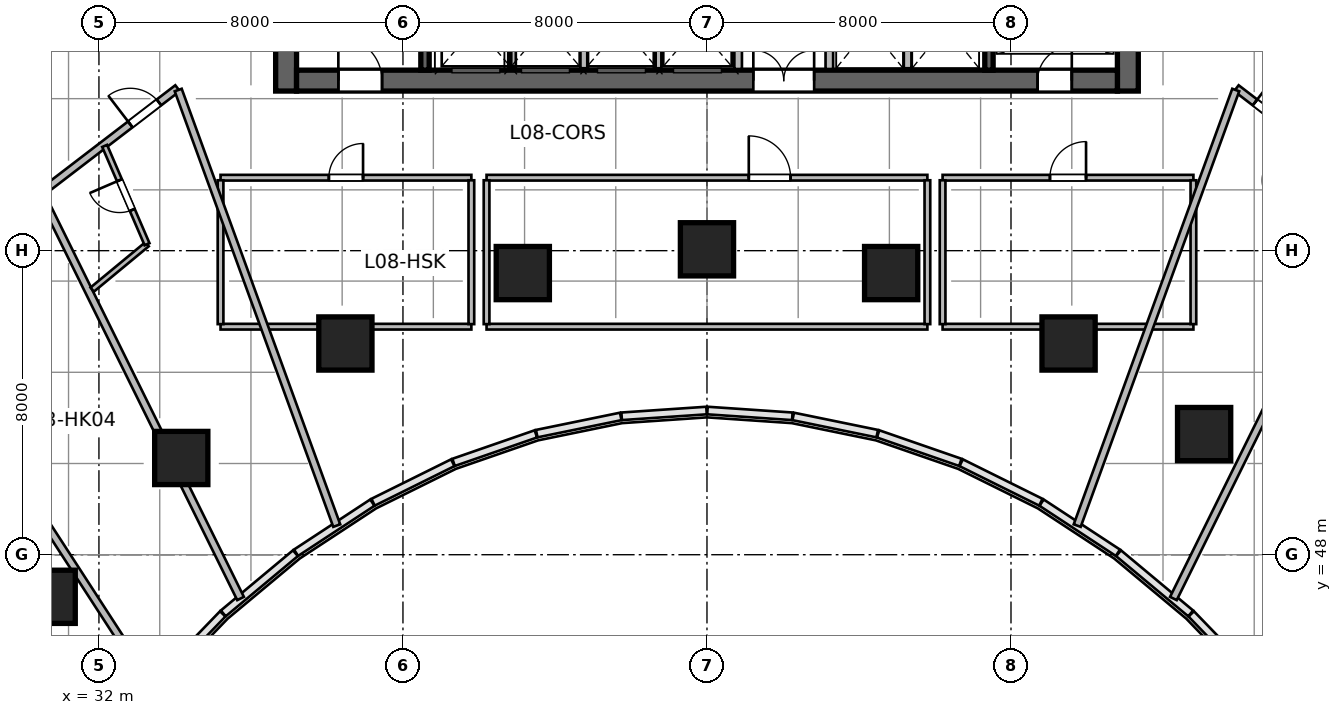
"""IFC4 building model, lengths in metres.
Left out: names, types, materials, properties, quantities, classifications, styles, units other than length and angle.
Written with IfcOpenShell. Run it as: python <this file> out.ifc"""

import sys

from ifc_helpers import new_model, si_unit, direction, frame, frame_2d, origin, origin_2d, place, context, subcontext, project, spatial, rectangle, circle, extrude, source, transform, mapped, element, fill, save


model = new_model("IFC4")
c1 = context("Model", 3, precision=1e-05, world=origin(), true_north=direction((0.0, 1.0)))
c2 = subcontext(c1, "Body", "Model", "MODEL_VIEW")
j1 = project(units=[si_unit("LENGTHUNIT", "METRE"), si_unit("PLANEANGLEUNIT", "RADIAN")], contexts=[c1])
p1 = place(None, origin())
s1 = spatial("IfcSite", under=j1, at=p1, CompositionType="ELEMENT")
p2 = place(p1, origin())
s2 = spatial("IfcBuilding", under=s1, at=p2, CompositionType="ELEMENT")
p3 = place(p2, frame((0.0, 0.0, 42.6)))
s3 = spatial("IfcBuildingStorey", under=s2, at=p3, CompositionType="ELEMENT", Elevation=42.6)
m1 = source(origin(), c2, "Body", "SweptSolid", [
    extrude(rectangle(XDim=12.0, YDim=0.55, at=frame_2d((6.0, 0.0))), origin(), (0.0, 0.0, 1.0), 3.6),
])
for number, where, z_axis, x_axis in (
    (1, (36.925, 60.2, 0.0), (0.0, 0.0, 1.0), (0.0, 1.0, 0.0)),
    (2, (59.075, 60.2, 0.0), (0.0, 0.0, 1.0), (0.0, 1.0, 0.0)),
):
    element("IfcWall", number, at=place(p3, frame(where, z_axis=z_axis, x_axis=x_axis)), inside=s3, PredefinedType="SHEAR", context=c2, shape_type="MappedRepresentation", body=[
        mapped(m1, transform((0.0, 0.0, 0.0), scale=1.0)),
    ])
m2 = source(origin(), c2, "Body", "SweptSolid", [
    extrude(rectangle(XDim=21.6, YDim=0.55, at=frame_2d((10.8, 0.0))), origin(), (0.0, 0.0, 1.0), 3.6),
])
p4 = place(p3, frame((37.2, 60.475, 0.0), z_axis=(0.0, 0.0, 1.0), x_axis=(1.0, 0.0, 0.0)))
e3 = element("IfcWall", 3, at=p4, inside=s3, PredefinedType="SHEAR", context=c2, shape_type="MappedRepresentation", body=[
    mapped(m2, transform((0.0, 0.0, 0.0), scale=1.0)),
])
p5 = place(p4, frame((1.1, 0.0, 0.0)))
e4 = element("IfcOpeningElement", 4, at=p5, cuts=e3, PredefinedType="OPENING", context=c2, shape_type="SweptSolid", body=[
    extrude(rectangle(XDim=1.15, YDim=2.15, at=frame_2d((0.575, 1.075))), frame((0.0, 0.285, 0.0), z_axis=(0.0, -1.0, 0.0), x_axis=(1.0, 0.0, 0.0)), (0.0, 0.0, 1.0), 0.57),
])
p6 = place(p4, frame((19.5, 0.0, 0.0)))
e5 = element("IfcOpeningElement", 5, at=p6, cuts=e3, PredefinedType="OPENING", context=c2, shape_type="SweptSolid", body=[
    extrude(rectangle(XDim=0.9, YDim=2.1, at=frame_2d((0.45, 1.05))), frame((0.0, 0.285, 0.0), z_axis=(0.0, -1.0, 0.0), x_axis=(1.0, 0.0, 0.0)), (0.0, 0.0, 1.0), 0.57),
])
p7 = place(p4, frame((12.02, 0.0, 0.0)))
e6 = element("IfcOpeningElement", 6, at=p7, cuts=e3, PredefinedType="OPENING", context=c2, shape_type="SweptSolid", body=[
    extrude(rectangle(XDim=1.6, YDim=2.15, at=frame_2d((0.8, 1.075))), frame((0.0, 0.285, 0.0), z_axis=(0.0, -1.0, 0.0), x_axis=(1.0, 0.0, 0.0)), (0.0, 0.0, 1.0), 0.57),
])
m3 = source(origin(), c2, "Body", "SweptSolid", [
    extrude(rectangle(XDim=10.9, YDim=0.22, at=frame_2d((5.45, 0.0))), origin(), (0.0, 0.0, 1.0), 3.6),
])
p8 = place(p3, frame((40.58, 60.75, 0.0), z_axis=(0.0, 0.0, 1.0), x_axis=(0.0, 1.0, 0.0)))
e7 = element("IfcWall", 7, at=p8, inside=s3, PredefinedType="SHEAR", context=c2, shape_type="MappedRepresentation", body=[
    mapped(m3, transform((0.0, 0.0, 0.0), scale=1.0)),
])
p9 = place(p3, frame((55.42, 60.75, 0.0), z_axis=(0.0, 0.0, 1.0), x_axis=(0.0, 1.0, 0.0)))
e8 = element("IfcWall", 8, at=p9, inside=s3, PredefinedType="SHEAR", context=c2, shape_type="MappedRepresentation", body=[
    mapped(m3, transform((0.0, 0.0, 0.0), scale=1.0)),
])
p10 = place(p9, frame((9.495, 0.0, 0.0)))
e9 = element("IfcOpeningElement", 9, at=p10, cuts=e8, PredefinedType="OPENING", context=c2, shape_type="SweptSolid", body=[
    extrude(rectangle(XDim=1.15, YDim=2.15, at=frame_2d((0.575, 1.075))), frame((0.0, 0.12, 0.0), z_axis=(0.0, -1.0, 0.0), x_axis=(1.0, 0.0, 0.0)), (0.0, 0.0, 1.0), 0.24),
])
m4 = source(origin(), c2, "Body", "SweptSolid", [
    extrude(circle(Radius=0.7, at=origin_2d()), origin(), (0.0, 0.0, 1.0), 3.6),
])
for number, where, z_axis, x_axis in (
    (10, (30.677, 46.892, 0.0), (0.0, 0.0, 1.0), (-0.571, 0.821, 0.0)),
    (11, (34.166, 50.545, 0.0), (0.0, 0.0, 1.0), (-0.436, 0.9, 0.0)),
    (12, (38.485, 53.558, 0.0), (0.0, 0.0, 1.0), (-0.289, 0.957, 0.0)),
    (13, (43.154, 55.411, 0.0), (0.0, 0.0, 1.0), (-0.143, 0.99, 0.0)),
    (14, (48.0, 56.036, 0.0), (0.0, 0.0, 1.0), (0.0, 1.0, 0.0)),
    (15, (52.846, 55.411, 0.0), (0.0, 0.0, 1.0), (0.143, 0.99, 0.0)),
    (16, (57.515, 53.558, 0.0), (0.0, 0.0, 1.0), (0.289, 0.957, 0.0)),
    (17, (61.082, 51.175, 0.0), (0.0, 0.0, 1.0), (0.409, 0.912, 0.0)),
):
    element("IfcColumn", number, at=place(p3, frame(where, z_axis=z_axis, x_axis=x_axis)), inside=s3, PredefinedType="COLUMN", context=c2, shape_type="MappedRepresentation", body=[
        mapped(m4, transform((0.0, 0.0, 0.0), scale=1.0)),
    ])
m5 = source(origin(), c2, "Body", "SweptSolid", [
    extrude(rectangle(XDim=2.24, YDim=0.2, at=frame_2d((1.12, 0.0))), origin(), (0.0, 0.0, 1.0), 3.36),
])
for number, where, z_axis, x_axis in (
    (18, (48.82, 60.78, 0.0), (0.0, 0.0, 1.0), (0.0, 1.0, 0.0)),
    (19, (51.22, 60.78, 0.0), (0.0, 0.0, 1.0), (0.0, 1.0, 0.0)),
):
    element("IfcWall", number, at=place(p3, frame(where, z_axis=z_axis, x_axis=x_axis)), inside=s3, PredefinedType="SOLIDWALL", context=c2, shape_type="MappedRepresentation", body=[
        mapped(m5, transform((0.0, 0.0, 0.0), scale=1.0)),
    ])
m6 = source(origin(), c2, "Body", "SweptSolid", [
    extrude(rectangle(XDim=2.2, YDim=0.2, at=frame_2d((1.1, 0.0))), origin(), (0.0, 0.0, 1.0), 3.36),
])
for number, where, z_axis, x_axis in (
    (20, (42.87, 60.8, 0.0), (0.0, 0.0, 1.0), (0.0, 1.0, 0.0)),
    (21, (44.77, 60.8, 0.0), (0.0, 0.0, 1.0), (0.0, 1.0, 0.0)),
    (22, (46.7, 60.8, 0.0), (0.0, 0.0, 1.0), (0.0, 1.0, 0.0)),
    (23, (53.28, 60.8, 0.0), (0.0, 0.0, 1.0), (0.0, 1.0, 0.0)),
):
    element("IfcWall", number, at=place(p3, frame(where, z_axis=z_axis, x_axis=x_axis)), inside=s3, PredefinedType="SOLIDWALL", context=c2, shape_type="MappedRepresentation", body=[
        mapped(m6, transform((0.0, 0.0, 0.0), scale=1.0)),
    ])
m7 = source(origin(), c2, "Body", "SweptSolid", [
    extrude(rectangle(XDim=6.6, YDim=0.15, at=frame_2d((3.3, 0.0))), origin(), (0.0, 0.0, 1.0), 2.803),
])
p11 = place(p3, frame((35.2, 54.0, 0.0), z_axis=(0.0, 0.0, 1.0), x_axis=(1.0, 0.0, 0.0)))
e24 = element("IfcWall", 24, at=p11, inside=s3, PredefinedType="PARTITIONING", context=c2, shape_type="MappedRepresentation", body=[
    mapped(m7, transform((0.0, 0.0, 0.0), scale=1.0)),
])
m8 = source(origin(), c2, "Body", "SweptSolid", [
    extrude(rectangle(XDim=6.6, YDim=0.15, at=frame_2d((3.3, 0.0))), origin(), (0.0, 0.0, 1.0), 3.36),
])
p12 = place(p3, frame((35.2, 57.92, 0.0), z_axis=(0.0, 0.0, 1.0), x_axis=(1.0, 0.0, 0.0)))
e25 = element("IfcWall", 25, at=p12, inside=s3, PredefinedType="PARTITIONING", context=c2, shape_type="MappedRepresentation", body=[
    mapped(m8, transform((0.0, 0.0, 0.0), scale=1.0)),
])
p13 = place(p12, frame((2.85, 0.0, 0.0)))
e26 = element("IfcOpeningElement", 26, at=p13, cuts=e25, PredefinedType="OPENING", context=c2, shape_type="SweptSolid", body=[
    extrude(rectangle(XDim=0.9, YDim=2.1, at=frame_2d((0.45, 1.05))), frame((0.0, 0.085, 0.0), z_axis=(0.0, -1.0, 0.0), x_axis=(1.0, 0.0, 0.0)), (0.0, 0.0, 1.0), 0.17),
])
m9 = source(origin(), c2, "Body", "SweptSolid", [
    extrude(rectangle(XDim=3.785, YDim=0.15, at=frame_2d((1.893, 0.0))), origin(), (0.0, 0.0, 1.0), 3.36),
])
for number, where, z_axis, x_axis in (
    (27, (35.2, 54.067, 0.0), (0.0, 0.0, 1.0), (0.0, 1.0, 0.0)),
    (28, (41.8, 54.067, 0.0), (0.0, 0.0, 1.0), (0.0, 1.0, 0.0)),
):
    element("IfcWall", number, at=place(p3, frame(where, z_axis=z_axis, x_axis=x_axis)), inside=s3, PredefinedType="PARTITIONING", context=c2, shape_type="MappedRepresentation", body=[
        mapped(m9, transform((0.0, 0.0, 0.0), scale=1.0)),
    ])
m10 = source(origin(), c2, "Body", "SweptSolid", [
    extrude(rectangle(XDim=11.6, YDim=0.15, at=frame_2d((5.8, 0.0))), origin(), (0.0, 0.0, 1.0), 3.36),
])
p14 = place(p3, frame((42.2, 54.0, 0.0), z_axis=(0.0, 0.0, 1.0), x_axis=(1.0, 0.0, 0.0)))
e29 = element("IfcWall", 29, at=p14, inside=s3, PredefinedType="PARTITIONING", context=c2, shape_type="MappedRepresentation", body=[
    mapped(m10, transform((0.0, 0.0, 0.0), scale=1.0)),
])
p15 = place(p3, frame((42.2, 57.92, 0.0), z_axis=(0.0, 0.0, 1.0), x_axis=(1.0, 0.0, 0.0)))
e30 = element("IfcWall", 30, at=p15, inside=s3, PredefinedType="PARTITIONING", context=c2, shape_type="MappedRepresentation", body=[
    mapped(m10, transform((0.0, 0.0, 0.0), scale=1.0)),
])
p16 = place(p15, frame((6.9, 0.0, 0.0)))
e31 = element("IfcOpeningElement", 31, at=p16, cuts=e30, PredefinedType="OPENING", context=c2, shape_type="SweptSolid", body=[
    extrude(rectangle(XDim=1.1, YDim=2.15, at=frame_2d((0.55, 1.075))), frame((0.0, 0.085, 0.0), z_axis=(0.0, -1.0, 0.0), x_axis=(1.0, 0.0, 0.0)), (0.0, 0.0, 1.0), 0.17),
])
for number, where, z_axis, x_axis in (
    (32, (42.2, 54.067, 0.0), (0.0, 0.0, 1.0), (0.0, 1.0, 0.0)),
    (33, (53.8, 54.067, 0.0), (0.0, 0.0, 1.0), (0.0, 1.0, 0.0)),
):
    element("IfcWall", number, at=place(p3, frame(where, z_axis=z_axis, x_axis=x_axis)), inside=s3, PredefinedType="PARTITIONING", context=c2, shape_type="MappedRepresentation", body=[
        mapped(m9, transform((0.0, 0.0, 0.0), scale=1.0)),
    ])
p17 = place(p3, frame((54.2, 54.0, 0.0), z_axis=(0.0, 0.0, 1.0), x_axis=(1.0, 0.0, 0.0)))
e34 = element("IfcWall", 34, at=p17, inside=s3, PredefinedType="PARTITIONING", context=c2, shape_type="MappedRepresentation", body=[
    mapped(m7, transform((0.0, 0.0, 0.0), scale=1.0)),
])
p18 = place(p3, frame((54.2, 57.92, 0.0), z_axis=(0.0, 0.0, 1.0), x_axis=(1.0, 0.0, 0.0)))
e35 = element("IfcWall", 35, at=p18, inside=s3, PredefinedType="PARTITIONING", context=c2, shape_type="MappedRepresentation", body=[
    mapped(m8, transform((0.0, 0.0, 0.0), scale=1.0)),
])
p19 = place(p18, frame((2.825, 0.0, 0.0)))
e36 = element("IfcOpeningElement", 36, at=p19, cuts=e35, PredefinedType="OPENING", context=c2, shape_type="SweptSolid", body=[
    extrude(rectangle(XDim=0.95, YDim=2.1, at=frame_2d((0.475, 1.05))), frame((0.0, 0.085, 0.0), z_axis=(0.0, -1.0, 0.0), x_axis=(1.0, 0.0, 0.0)), (0.0, 0.0, 1.0), 0.17),
])
for number, where, z_axis, x_axis in (
    (37, (54.2, 54.067, 0.0), (0.0, 0.0, 1.0), (0.0, 1.0, 0.0)),
    (38, (60.8, 54.067, 0.0), (0.0, 0.0, 1.0), (0.0, 1.0, 0.0)),
):
    element("IfcWall", number, at=place(p3, frame(where, z_axis=z_axis, x_axis=x_axis)), inside=s3, PredefinedType="PARTITIONING", context=c2, shape_type="MappedRepresentation", body=[
        mapped(m9, transform((0.0, 0.0, 0.0), scale=1.0)),
    ])
m11 = source(origin(), c2, "Body", "SweptSolid", [
    extrude(rectangle(XDim=11.053, YDim=0.195, at=frame_2d((5.527, 0.0))), origin(), (0.0, 0.0, 1.0), 2.984),
])
p20 = place(p3, frame((31.466, 41.949, 0.0), z_axis=(0.0, 0.0, 1.0), x_axis=(-0.638131235571, 0.769927611005, 0.0)))
e39 = element("IfcWall", 39, at=p20, inside=s3, PredefinedType="PARTITIONING", context=c2, shape_type="MappedRepresentation", body=[
    mapped(m11, transform((0.0, 0.0, 0.0), scale=1.0)),
])
m12 = source(origin(), c2, "Body", "SweptSolid", [
    extrude(rectangle(XDim=11.429, YDim=0.195, at=frame_2d((5.714, 0.0))), origin(), (0.0, 0.0, 1.0), 3.36),
])
p21 = place(p3, frame((33.396, 44.511, 0.0), z_axis=(0.0, 0.0, 1.0), x_axis=(-0.544215487077, 0.838945471187, 0.0)))
e40 = element("IfcWall", 40, at=p21, inside=s3, PredefinedType="PARTITIONING", context=c2, shape_type="MappedRepresentation", body=[
    mapped(m12, transform((0.0, 0.0, 0.0), scale=1.0)),
])
m13 = source(origin(), c2, "Body", "SweptSolid", [
    extrude(rectangle(XDim=11.844, YDim=0.195, at=frame_2d((5.922, 0.0))), origin(), (0.0, 0.0, 1.0), 2.644),
])
p22 = place(p3, frame((35.727, 46.848, 0.0), z_axis=(0.0, 0.0, 1.0), x_axis=(-0.442871152218, 0.896585267854, 0.0)))
e41 = element("IfcWall", 41, at=p22, inside=s3, PredefinedType="PARTITIONING", context=c2, shape_type="MappedRepresentation", body=[
    mapped(m13, transform((0.0, 0.0, 0.0), scale=1.0)),
])
m14 = source(origin(), c2, "Body", "SweptSolid", [
    extrude(rectangle(XDim=4.895, YDim=0.195, at=frame_2d((2.447, 0.0))), origin(), (0.0, 0.0, 1.0), 3.36),
])
p23 = place(p3, frame((29.113, 60.238, 0.0), z_axis=(0.0, 0.0, 1.0), x_axis=(0.793896075849, 0.608053468661, 0.0)))
e42 = element("IfcWall", 42, at=p23, inside=s3, PredefinedType="PARTITIONING", context=c2, shape_type="MappedRepresentation", body=[
    mapped(m14, transform((0.0, 0.0, 0.0), scale=1.0)),
])
p24 = place(p23, frame((3.245, 0.0, 0.0)))
e43 = element("IfcOpeningElement", 43, at=p24, cuts=e42, PredefinedType="OPENING", context=c2, shape_type="SweptSolid", body=[
    extrude(rectangle(XDim=0.95, YDim=2.15, at=frame_2d((0.475, 1.075))), frame((0.0, 0.107, 0.0), z_axis=(0.0, -1.0, 0.0), x_axis=(1.0, 0.0, 0.0)), (0.0, 0.0, 1.0), 0.215),
])
m15 = source(origin(), c2, "Body", "SweptSolid", [
    extrude(rectangle(XDim=4.546, YDim=0.195, at=frame_2d((2.273, 0.0))), origin(), (0.0, 0.0, 1.0), 3.36),
])
p25 = place(p3, frame((30.459, 57.511, 0.0), z_axis=(0.0, 0.0, 1.0), x_axis=(0.793907931297, 0.608037989457, 0.0)))
e44 = element("IfcWall", 44, at=p25, inside=s3, PredefinedType="PARTITIONING", context=c2, shape_type="MappedRepresentation", body=[
    mapped(m15, transform((0.0, 0.0, 0.0), scale=1.0)),
])
p26 = place(p25, frame((2.98, 0.0, 0.0)))
e45 = element("IfcOpeningElement", 45, at=p26, cuts=e44, PredefinedType="OPENING", context=c2, shape_type="SweptSolid", body=[
    extrude(rectangle(XDim=0.95, YDim=2.15, at=frame_2d((0.475, 1.075))), frame((0.0, 0.107, 0.0), z_axis=(0.0, -1.0, 0.0), x_axis=(1.0, 0.0, 0.0)), (0.0, 0.0, 1.0), 0.215),
])
m16 = source(origin(), c2, "Body", "SweptSolid", [
    extrude(rectangle(XDim=12.196, YDim=0.195, at=frame_2d((6.098, 0.0))), origin(), (0.0, 0.0, 1.0), 3.36),
])
p27 = place(p3, frame((38.258, 48.766, 0.0), z_axis=(0.0, 0.0, 1.0), x_axis=(-0.342022711534, 0.939691686031, 0.0)))
e46 = element("IfcWall", 46, at=p27, inside=s3, PredefinedType="PARTITIONING", context=c2, shape_type="MappedRepresentation", body=[
    mapped(m16, transform((0.0, 0.0, 0.0), scale=1.0)),
])
m17 = source(origin(), c2, "Body", "SweptSolid", [
    extrude(rectangle(XDim=1.873, YDim=0.14, at=frame_2d((0.937, 0.0))), origin(), (0.0, 0.0, 1.0), 3.36),
])
p28 = place(p3, frame((31.823, 54.976, 0.0), z_axis=(0.0, 0.0, 1.0), x_axis=(0.77069451688, 0.637204803537, 0.0)))
e47 = element("IfcWall", 47, at=p28, inside=s3, PredefinedType="PARTITIONING", context=c2, shape_type="MappedRepresentation", body=[
    mapped(m17, transform((0.0, 0.0, 0.0), scale=1.0)),
])
m18 = source(origin(), c2, "Body", "SweptSolid", [
    extrude(rectangle(XDim=2.817, YDim=0.14, at=frame_2d((1.409, 0.0))), origin(), (0.0, 0.0, 1.0), 3.36),
])
p29 = place(p3, frame((33.266, 56.169, 0.0), z_axis=(0.0, 0.0, 1.0), x_axis=(-0.395999429727, 0.918250756415, 0.0)))
e48 = element("IfcWall", 48, at=p29, inside=s3, PredefinedType="PARTITIONING", context=c2, shape_type="MappedRepresentation", body=[
    mapped(m18, transform((0.0, 0.0, 0.0), scale=1.0)),
])
p30 = place(p29, frame((0.984, 0.0, 0.0)))
e49 = element("IfcOpeningElement", 49, at=p30, cuts=e48, PredefinedType="OPENING", context=c2, shape_type="SweptSolid", body=[
    extrude(rectangle(XDim=0.85, YDim=2.05, at=frame_2d((0.425, 1.025))), frame((0.0, 0.08, 0.0), z_axis=(0.0, -1.0, 0.0), x_axis=(1.0, 0.0, 0.0)), (0.0, 0.0, 1.0), 0.16),
])
p31 = place(p3, frame((61.931, 60.275, 0.0), z_axis=(0.0, 0.0, 1.0), x_axis=(0.793907931297, -0.608037989457, 0.0)))
e50 = element("IfcWall", 50, at=p31, inside=s3, PredefinedType="PARTITIONING", context=c2, shape_type="MappedRepresentation", body=[
    mapped(m15, transform((0.0, 0.0, 0.0), scale=1.0)),
])
p32 = place(p31, frame((0.616, 0.0, 0.0)))
e51 = element("IfcOpeningElement", 51, at=p32, cuts=e50, PredefinedType="OPENING", context=c2, shape_type="SweptSolid", body=[
    extrude(rectangle(XDim=0.95, YDim=2.15, at=frame_2d((0.475, 1.075))), frame((0.0, 0.107, 0.0), z_axis=(0.0, -1.0, 0.0), x_axis=(1.0, 0.0, 0.0)), (0.0, 0.0, 1.0), 0.215),
])
p33 = place(p3, frame((57.742, 48.766, 0.0), z_axis=(0.0, 0.0, 1.0), x_axis=(0.342022711534, 0.939691686031, 0.0)))
e52 = element("IfcWall", 52, at=p33, inside=s3, PredefinedType="PARTITIONING", context=c2, shape_type="MappedRepresentation", body=[
    mapped(m16, transform((0.0, 0.0, 0.0), scale=1.0)),
])
m19 = source(origin(), c2, "Body", "SweptSolid", [
    extrude(rectangle(XDim=11.844, YDim=0.195, at=frame_2d((5.922, 0.0))), origin(), (0.0, 0.0, 1.0), 3.36),
])
p34 = place(p3, frame((60.273, 46.848, 0.0), z_axis=(0.0, 0.0, 1.0), x_axis=(0.442871152218, 0.896585267854, 0.0)))
e53 = element("IfcWall", 53, at=p34, inside=s3, PredefinedType="PARTITIONING", context=c2, shape_type="MappedRepresentation", body=[
    mapped(m19, transform((0.0, 0.0, 0.0), scale=1.0)),
])
p35 = place(p3, frame((62.604, 44.511, 0.0), z_axis=(0.0, 0.0, 1.0), x_axis=(0.544215487077, 0.838945471187, 0.0)))
e54 = element("IfcWall", 54, at=p35, inside=s3, PredefinedType="PARTITIONING", context=c2, shape_type="MappedRepresentation", body=[
    mapped(m12, transform((0.0, 0.0, 0.0), scale=1.0)),
])
m20 = source(origin(), c2, "Body", "SweptSolid", [
    extrude(rectangle(XDim=1.15, YDim=2.15, at=frame_2d((0.575, 1.075))), frame((0.0, 0.025, 0.0), z_axis=(0.0, -1.0, 0.0), x_axis=(1.0, 0.0, 0.0)), (0.0, 0.0, 1.0), 0.05),
])
p36 = place(p5, origin())
e55 = element("IfcDoor", 55, at=p36, inside=s3, OperationType="SINGLE_SWING_LEFT", PredefinedType="DOOR", context=c2, shape_type="MappedRepresentation", body=[
    mapped(m20, transform((0.0, 0.0, 0.0), scale=1.0)),
])
fill(e4, e55)
m21 = source(origin(), c2, "Body", "SweptSolid", [
    extrude(rectangle(XDim=0.9, YDim=2.1, at=frame_2d((0.45, 1.05))), frame((0.0, 0.025, 0.0), z_axis=(0.0, -1.0, 0.0), x_axis=(1.0, 0.0, 0.0)), (0.0, 0.0, 1.0), 0.05),
])
p37 = place(p6, origin())
e56 = element("IfcDoor", 56, at=p37, inside=s3, OperationType="SINGLE_SWING_RIGHT", PredefinedType="DOOR", context=c2, shape_type="MappedRepresentation", body=[
    mapped(m21, transform((0.0, 0.0, 0.0), scale=1.0)),
])
fill(e5, e56)
m22 = source(origin(), c2, "Body", "SweptSolid", [
    extrude(rectangle(XDim=1.6, YDim=2.15, at=frame_2d((0.8, 1.075))), frame((0.0, 0.025, 0.0), z_axis=(0.0, -1.0, 0.0), x_axis=(1.0, 0.0, 0.0)), (0.0, 0.0, 1.0), 0.05),
])
p38 = place(p7, origin())
e57 = element("IfcDoor", 57, at=p38, inside=s3, OperationType="DOUBLE_DOOR_SINGLE_SWING", PredefinedType="DOOR", context=c2, shape_type="MappedRepresentation", body=[
    mapped(m22, transform((0.0, 0.0, 0.0), scale=1.0)),
])
fill(e6, e57)
p39 = place(p13, origin())
e58 = element("IfcDoor", 58, at=p39, inside=s3, OperationType="SINGLE_SWING_RIGHT", PredefinedType="DOOR", context=c2, shape_type="MappedRepresentation", body=[
    mapped(m21, transform((0.0, 0.0, 0.0), scale=1.0)),
])
fill(e26, e58)
m23 = source(origin(), c2, "Body", "SweptSolid", [
    extrude(rectangle(XDim=1.1, YDim=2.15, at=frame_2d((0.55, 1.075))), frame((0.0, 0.025, 0.0), z_axis=(0.0, -1.0, 0.0), x_axis=(1.0, 0.0, 0.0)), (0.0, 0.0, 1.0), 0.05),
])
p40 = place(p16, origin())
e59 = element("IfcDoor", 59, at=p40, inside=s3, OperationType="SINGLE_SWING_LEFT", PredefinedType="DOOR", context=c2, shape_type="MappedRepresentation", body=[
    mapped(m23, transform((0.0, 0.0, 0.0), scale=1.0)),
])
fill(e31, e59)
m24 = source(origin(), c2, "Body", "SweptSolid", [
    extrude(rectangle(XDim=0.95, YDim=2.1, at=frame_2d((0.475, 1.05))), frame((0.0, 0.025, 0.0), z_axis=(0.0, -1.0, 0.0), x_axis=(1.0, 0.0, 0.0)), (0.0, 0.0, 1.0), 0.05),
])
p41 = place(p19, origin())
e60 = element("IfcDoor", 60, at=p41, inside=s3, OperationType="SINGLE_SWING_RIGHT", PredefinedType="DOOR", context=c2, shape_type="MappedRepresentation", body=[
    mapped(m24, transform((0.0, 0.0, 0.0), scale=1.0)),
])
fill(e36, e60)
m25 = source(origin(), c2, "Body", "SweptSolid", [
    extrude(rectangle(XDim=0.95, YDim=2.15, at=frame_2d((0.475, 1.075))), frame((0.0, 0.025, 0.0), z_axis=(0.0, -1.0, 0.0), x_axis=(1.0, 0.0, 0.0)), (0.0, 0.0, 1.0), 0.05),
])
p42 = place(p26, origin())
e61 = element("IfcDoor", 61, at=p42, inside=s3, OperationType="SINGLE_SWING_LEFT", PredefinedType="DOOR", context=c2, shape_type="MappedRepresentation", body=[
    mapped(m25, transform((0.0, 0.0, 0.0), scale=1.0)),
])
fill(e45, e61)
m26 = source(origin(), c2, "Body", "SweptSolid", [
    extrude(rectangle(XDim=0.85, YDim=2.05, at=frame_2d((0.425, 1.025))), frame((0.0, 0.025, 0.0), z_axis=(0.0, -1.0, 0.0), x_axis=(1.0, 0.0, 0.0)), (0.0, 0.0, 1.0), 0.05),
])
p43 = place(p30, origin())
e62 = element("IfcDoor", 62, at=p43, inside=s3, OperationType="SINGLE_SWING_RIGHT", PredefinedType="DOOR", context=c2, shape_type="MappedRepresentation", body=[
    mapped(m26, transform((0.0, 0.0, 0.0), scale=1.0)),
])
fill(e49, e62)
p44 = place(p32, origin())
e63 = element("IfcDoor", 63, at=p44, inside=s3, OperationType="SINGLE_SWING_LEFT", PredefinedType="DOOR", context=c2, shape_type="MappedRepresentation", body=[
    mapped(m25, transform((0.0, 0.0, 0.0), scale=1.0)),
])
fill(e51, e63)
save(model, sys.argv[1])
